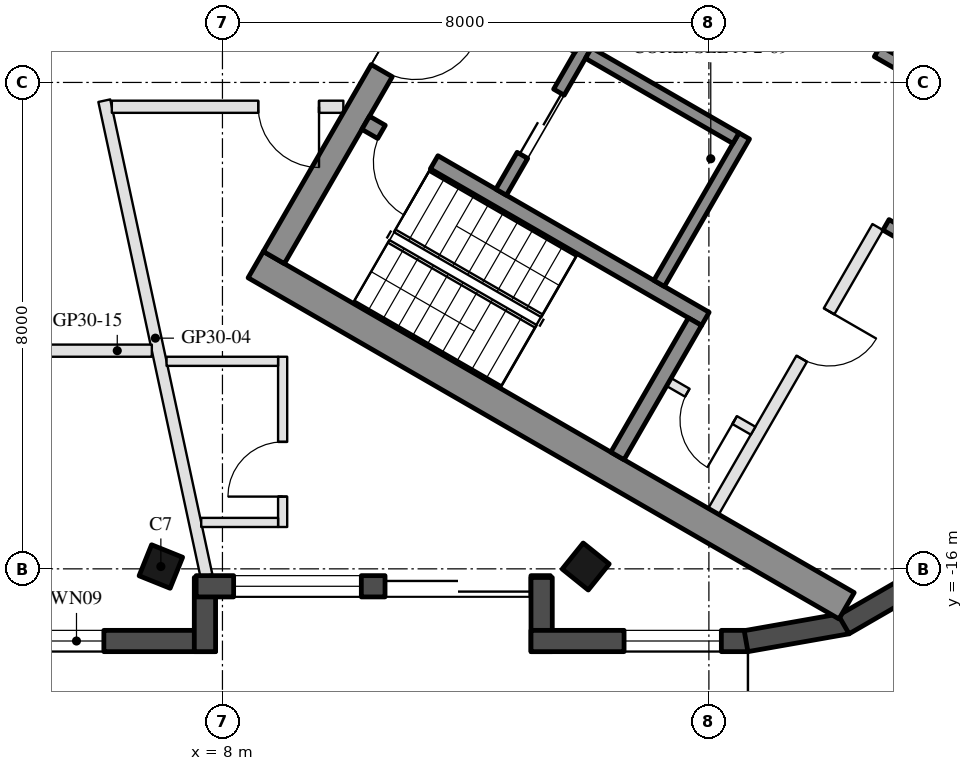
"""IFC4 building model, lengths in metres.
Left out: names, types, materials, properties, quantities, classifications, styles, units other than length and angle.
Written with IfcOpenShell. Run it as: python <this file> out.ifc"""

import sys

from ifc_helpers import new_model, si_unit, direction, frame, frame_2d, origin, origin_2d, place, context, subcontext, project, spatial, rectangle, hollow_rectangle, extrude, boolean, halfspace, element, fill, save


model = new_model("IFC4")
c1 = context("Model", 3, precision=1e-05, world=origin(), true_north=direction((0.0, 1.0)))
c2 = subcontext(c1, "Body", "Model", "MODEL_VIEW")
j1 = project(units=[si_unit("LENGTHUNIT", "METRE"), si_unit("PLANEANGLEUNIT", "RADIAN")], contexts=[c1])
p1 = place(None, origin())
s1 = spatial("IfcSite", under=j1, at=p1, CompositionType="ELEMENT")
p2 = place(p1, origin())
s2 = spatial("IfcBuilding", under=s1, at=p2, CompositionType="ELEMENT")
p3 = place(p2, frame((0.0, 0.0, 298.5)))
s3 = spatial("IfcBuildingStorey", under=s2, at=p3, CompositionType="ELEMENT", Elevation=298.5)
p4 = place(p3, frame((6.987, -15.962, 0.0), z_axis=(-0.060870463553, 0.151232178432, 0.986622326361), x_axis=(0.998135049207, 0.004661833801, 0.060866171632)))
e1 = element("IfcColumn", 1, at=p4, inside=s3, PredefinedType="COLUMN", context=c2, shape_type="SweptSolid", body=[
    boolean("DIFFERENCE", boolean("DIFFERENCE", extrude(hollow_rectangle(XDim=0.55, YDim=0.55, WallThickness=0.025, at=origin_2d()), origin(), (0.0, 0.0, 1.0), 3.75), halfspace(frame((0.0, 0.0, 0.034), z_axis=(0.0, 0.0, 1.0), x_axis=(1.0, 0.0, 0.0)), True)), halfspace(frame((0.0, 0.0, 3.716), z_axis=(0.0, 0.0, 1.0), x_axis=(1.0, 0.0, 0.0)), False)),
])
p5 = place(p3, frame((13.974, -15.962, 0.0), z_axis=(-0.121006106938, 0.150399778714, 0.981191840899), x_axis=(0.992607126943, 0.008959505222, 0.121040566785)))
e2 = element("IfcColumn", 2, at=p5, inside=s3, PredefinedType="COLUMN", context=c2, shape_type="SweptSolid", body=[
    boolean("DIFFERENCE", boolean("DIFFERENCE", extrude(hollow_rectangle(XDim=0.55, YDim=0.55, WallThickness=0.025, at=origin_2d()), origin(), (0.0, 0.0, 1.0), 3.771), halfspace(frame((0.0, 0.0, 0.04), z_axis=(0.0, 0.0, 1.0), x_axis=(1.0, 0.0, 0.0)), True)), halfspace(frame((0.0, 0.0, 3.731), z_axis=(0.0, 0.0, 1.0), x_axis=(1.0, 0.0, 0.0)), False)),
])
p6 = place(p3, frame((20.936, -12.087, 0.0), z_axis=(-0.190408197016, 0.109880592395, 0.975536249416), x_axis=(0.499868084483, 0.866101551773, 1.1510724e-05)))
e3 = element("IfcColumn", 3, at=p6, inside=s3, PredefinedType="COLUMN", context=c2, shape_type="SweptSolid", body=[
    boolean("DIFFERENCE", boolean("DIFFERENCE", extrude(hollow_rectangle(XDim=2.0, YDim=2.0, WallThickness=0.05, at=origin_2d()), origin(), (0.0, 0.0, 1.0), 3.793), halfspace(frame((0.0, 0.0, 0.113), z_axis=(0.0, 0.0, 1.0), x_axis=(1.0, 0.0, 0.0)), True)), halfspace(frame((0.0, 0.0, 3.679), z_axis=(0.0, 0.0, 1.0), x_axis=(1.0, 0.0, 0.0)), False)),
])
p7 = place(p3, frame((-0.9, -17.187, 0.0), z_axis=(0.0, 0.0, 1.0), x_axis=(1.0, 0.0, 0.0)))
e4 = element("IfcWall", 4, at=p7, inside=s3, PredefinedType="SOLIDWALL", context=c2, shape_type="SweptSolid", body=[
    extrude(rectangle(XDim=8.787, YDim=0.35, at=frame_2d((4.394, 0.0))), origin(), (0.0, 0.0, 1.0), 3.55),
])
p8 = place(p7, frame((1.528, 0.0, 0.3)))
e5 = element("IfcOpeningElement", 5, at=p8, cuts=e4, PredefinedType="OPENING", context=c2, shape_type="SweptSolid", body=[
    extrude(rectangle(XDim=0.9, YDim=2.65, at=frame_2d((0.45, 1.325))), frame((0.0, 0.185, 0.0), z_axis=(0.0, -1.0, 0.0), x_axis=(1.0, 0.0, 0.0)), (0.0, 0.0, 1.0), 0.37),
])
p9 = place(p7, frame((3.35, 0.0, 0.0)))
e6 = element("IfcOpeningElement", 6, at=p9, cuts=e4, PredefinedType="OPENING", context=c2, shape_type="SweptSolid", body=[
    extrude(rectangle(XDim=2.4, YDim=2.4, at=frame_2d((1.2, 1.2))), frame((0.0, 0.185, 0.0), z_axis=(0.0, -1.0, 0.0), x_axis=(1.0, 0.0, 0.0)), (0.0, 0.0, 1.0), 0.37),
])
p10 = place(p7, frame((6.05, 0.0, 0.3)))
e7 = element("IfcOpeningElement", 7, at=p10, cuts=e4, PredefinedType="OPENING", context=c2, shape_type="SweptSolid", body=[
    extrude(rectangle(XDim=0.9, YDim=2.65, at=frame_2d((0.45, 1.325))), frame((0.0, 0.185, 0.0), z_axis=(0.0, -1.0, 0.0), x_axis=(1.0, 0.0, 0.0)), (0.0, 0.0, 1.0), 0.37),
])
p11 = place(p3, frame((7.712, -17.362, 0.0), z_axis=(0.0, 0.0, 1.0), x_axis=(0.0, 1.0, 0.0)))
e8 = element("IfcWall", 8, at=p11, inside=s3, PredefinedType="SOLIDWALL", context=c2, shape_type="SweptSolid", body=[
    extrude(rectangle(XDim=1.22, YDim=0.35, at=frame_2d((0.61, 0.0))), origin(), (0.0, 0.0, 1.0), 3.55),
])
p12 = place(p3, frame((7.567, -16.287, 0.0), z_axis=(0.0, 0.0, 1.0), x_axis=(1.0, 0.0, 0.0)))
e9 = element("IfcWall", 9, at=p12, inside=s3, PredefinedType="SOLIDWALL", context=c2, shape_type="SweptSolid", body=[
    extrude(rectangle(XDim=5.827, YDim=0.35, at=frame_2d((2.914, 0.0))), origin(), (0.0, 0.0, 1.0), 3.55),
])
p13 = place(p12, frame((3.107, 0.0, 0.0)))
e10 = element("IfcOpeningElement", 10, at=p13, cuts=e9, PredefinedType="OPENING", context=c2, shape_type="SweptSolid", body=[
    extrude(rectangle(XDim=2.4, YDim=2.4, at=frame_2d((1.2, 1.2))), frame((0.0, 0.185, 0.0), z_axis=(0.0, -1.0, 0.0), x_axis=(1.0, 0.0, 0.0)), (0.0, 0.0, 1.0), 0.37),
])
p14 = place(p12, frame((0.617, 0.0, 0.3)))
e11 = element("IfcOpeningElement", 11, at=p14, cuts=e9, PredefinedType="OPENING", context=c2, shape_type="SweptSolid", body=[
    extrude(rectangle(XDim=2.1, YDim=2.65, at=frame_2d((1.05, 1.325))), frame((0.0, 0.185, 0.0), z_axis=(0.0, -1.0, 0.0), x_axis=(1.0, 0.0, 0.0)), (0.0, 0.0, 1.0), 0.37),
])
p15 = place(p3, frame((13.249, -16.142, 0.0), z_axis=(0.0, 0.0, 1.0), x_axis=(0.0, -1.0, 0.0)))
e12 = element("IfcWall", 12, at=p15, inside=s3, PredefinedType="SOLIDWALL", context=c2, shape_type="SweptSolid", body=[
    extrude(rectangle(XDim=1.22, YDim=0.35, at=frame_2d((0.61, 0.0))), origin(), (0.0, 0.0, 1.0), 3.55),
])
p16 = place(p3, frame((13.074, -17.187, 0.0), z_axis=(0.0, 0.0, 1.0), x_axis=(1.0, 0.0, 0.0)))
e13 = element("IfcWall", 13, at=p16, inside=s3, PredefinedType="SOLIDWALL", context=c2, shape_type="SweptSolid", body=[
    extrude(rectangle(XDim=3.567, YDim=0.35, at=frame_2d((1.784, 0.0))), origin(), (0.0, 0.0, 1.0), 3.55),
])
p17 = place(p16, frame((1.531, 0.0, 0.3)))
e14 = element("IfcOpeningElement", 14, at=p17, cuts=e13, PredefinedType="OPENING", context=c2, shape_type="SweptSolid", body=[
    extrude(rectangle(XDim=1.6, YDim=2.65, at=frame_2d((0.8, 1.325))), frame((0.0, 0.185, 0.0), z_axis=(0.0, -1.0, 0.0), x_axis=(1.0, 0.0, 0.0)), (0.0, 0.0, 1.0), 0.37),
])
for number, where, z_axis, x_axis in (
    (15, (16.611, -17.189, 0.0), (0.0, 0.0, 1.0), (0.985, 0.174, 0.0)),
    (16, (18.218, -16.917, 0.0), (0.0, 0.0, 1.0), (0.866, 0.5, 0.0)),
):
    element("IfcWall", number, at=place(p3, frame(where, z_axis=z_axis, x_axis=x_axis)), inside=s3, PredefinedType="SOLIDWALL", context=c2, shape_type="SweptSolid", body=[
        extrude(rectangle(XDim=1.689, YDim=0.35, at=frame_2d((0.845, 0.0))), origin(), (0.0, 0.0, 1.0), 3.55),
    ])
for number, where, z_axis, x_axis in (
    (17, (8.547, -10.997, 0.0), (0.0, 0.0, 1.0), (0.866, -0.5, 0.0)),
    (18, (13.797, -1.903, 0.0), (0.0, 0.0, 1.0), (0.866, -0.5, 0.0)),
):
    element("IfcWall", number, at=place(p3, frame(where, z_axis=z_axis, x_axis=x_axis)), inside=s3, PredefinedType="SHEAR", context=c2, shape_type="SweptSolid", body=[
        extrude(rectangle(XDim=11.222, YDim=0.5, at=frame_2d((5.611, 0.0))), origin(), (0.0, 0.0, 1.0), 3.5),
    ])
p18 = place(p3, frame((8.845, -10.88, 0.0), z_axis=(0.0, 0.0, 1.0), x_axis=(0.500004234368, 0.866022959057, 0.0)))
e19 = element("IfcWall", 19, at=p18, inside=s3, PredefinedType="SHEAR", context=c2, shape_type="SweptSolid", body=[
    extrude(rectangle(XDim=10.0, YDim=0.4, at=frame_2d((5.0, 0.0))), origin(), (0.0, 0.0, 1.0), 3.5),
])
p19 = place(p18, frame((3.55, 0.0, 0.0)))
e20 = element("IfcOpeningElement", 20, at=p19, cuts=e19, PredefinedType="OPENING", context=c2, shape_type="SweptSolid", body=[
    extrude(rectangle(XDim=1.1, YDim=2.1, at=frame_2d((0.55, 1.05))), frame((0.0, 0.21, 0.0), z_axis=(0.0, -1.0, 0.0), x_axis=(1.0, 0.0, 0.0)), (0.0, 0.0, 1.0), 0.42),
])
p20 = place(p18, frame((5.85, 0.0, 0.0)))
e21 = element("IfcOpeningElement", 21, at=p20, cuts=e19, PredefinedType="OPENING", context=c2, shape_type="SweptSolid", body=[
    extrude(rectangle(XDim=1.4, YDim=2.1, at=frame_2d((0.7, 1.05))), frame((0.0, 0.21, 0.0), z_axis=(0.0, -1.0, 0.0), x_axis=(1.0, 0.0, 0.0)), (0.0, 0.0, 1.0), 0.42),
])
p21 = place(p3, frame((10.356, -8.664, 0.0), z_axis=(0.0, 0.0, 1.0), x_axis=(0.866028629588, -0.499994412703, 0.0)))
e22 = element("IfcWall", 22, at=p21, inside=s3, PredefinedType="SHEAR", context=c2, shape_type="SweptSolid", body=[
    extrude(rectangle(XDim=6.45, YDim=0.25, at=frame_2d((3.225, 0.0))), origin(), (0.0, 0.0, 1.0), 3.5),
])
p22 = place(p21, frame((0.3, 0.0, 0.0)))
e23 = element("IfcOpeningElement", 23, at=p22, cuts=e22, PredefinedType="OPENING", context=c2, shape_type="SweptSolid", body=[
    extrude(rectangle(XDim=1.0, YDim=2.1, at=frame_2d((0.5, 1.05))), frame((0.0, 0.135, 0.0), z_axis=(0.0, -1.0, 0.0), x_axis=(1.0, 0.0, 0.0)), (0.0, 0.0, 1.0), 0.27),
])
p23 = place(p3, frame((14.496, -14.143, 0.0), z_axis=(0.0, 0.0, 1.0), x_axis=(0.500062241894, 0.865989465428, 0.0)))
e24 = element("IfcWall", 24, at=p23, inside=s3, PredefinedType="SHEAR", context=c2, shape_type="SweptSolid", body=[
    extrude(rectangle(XDim=2.55, YDim=0.25, at=frame_2d((1.275, 0.0))), origin(), (0.0, 0.0, 1.0), 3.5),
])
p24 = place(p3, frame((15.181, -11.305, 0.0), z_axis=(0.0, 0.0, 1.0), x_axis=(0.49994636267, 0.866056369097, 0.0)))
e25 = element("IfcWall", 25, at=p24, inside=s3, PredefinedType="SHEAR", context=c2, shape_type="SweptSolid", body=[
    extrude(rectangle(XDim=2.8, YDim=0.2, at=frame_2d((1.4, 0.0))), origin(), (0.0, 0.0, 1.0), 3.5),
])
p25 = place(p3, frame((12.583, -9.805, 0.0), z_axis=(0.0, 0.0, 1.0), x_axis=(0.49994636267, 0.866056369097, 0.0)))
e26 = element("IfcWall", 26, at=p25, inside=s3, PredefinedType="SHEAR", context=c2, shape_type="SweptSolid", body=[
    extrude(rectangle(XDim=2.8, YDim=0.2, at=frame_2d((1.4, 0.0))), origin(), (0.0, 0.0, 1.0), 3.5),
])
p26 = place(p25, frame((0.7, 0.0, 0.0)))
e27 = element("IfcOpeningElement", 27, at=p26, cuts=e26, PredefinedType="OPENING", context=c2, shape_type="SweptSolid", body=[
    extrude(rectangle(XDim=1.2, YDim=2.1, at=frame_2d((0.6, 1.05))), frame((0.0, 0.11, 0.0), z_axis=(0.0, -1.0, 0.0), x_axis=(1.0, 0.0, 0.0)), (0.0, 0.0, 1.0), 0.22),
])
p27 = place(p3, frame((11.768, -6.217, 0.0), z_axis=(0.0, 0.0, 1.0), x_axis=(0.866050077142, -0.499957262057, 0.0)))
e28 = element("IfcWall", 28, at=p27, inside=s3, PredefinedType="SHEAR", context=c2, shape_type="SweptSolid", body=[
    extrude(rectangle(XDim=2.4, YDim=0.2, at=frame_2d((1.2, 0.0))), origin(), (0.0, 0.0, 1.0), 3.5),
])
p28 = place(p3, frame((14.02, -7.517, 0.0), z_axis=(0.0, 0.0, 1.0), x_axis=(0.866034573852, -0.49998411664, 0.0)))
e29 = element("IfcWall", 29, at=p28, inside=s3, PredefinedType="SHEAR", context=c2, shape_type="SweptSolid", body=[
    extrude(rectangle(XDim=2.8, YDim=0.2, at=frame_2d((1.4, 0.0))), origin(), (0.0, 0.0, 1.0), 3.5),
])
p29 = place(p3, frame((12.968, -4.138, 0.0), z_axis=(0.0, 0.0, 1.0), x_axis=(0.866028328073, -0.49999493495, 0.0)))
e30 = element("IfcWall", 30, at=p29, inside=s3, PredefinedType="SHEAR", context=c2, shape_type="SweptSolid", body=[
    extrude(rectangle(XDim=10.16, YDim=0.2, at=frame_2d((5.08, 0.0))), origin(), (0.0, 0.0, 1.0), 3.5),
])
p30 = place(p29, frame((0.62, 0.0, 0.0)))
e31 = element("IfcOpeningElement", 31, at=p30, cuts=e30, PredefinedType="OPENING", context=c2, shape_type="SweptSolid", body=[
    extrude(rectangle(XDim=1.1, YDim=2.1, at=frame_2d((0.55, 1.05))), frame((0.0, 0.11, 0.0), z_axis=(0.0, -1.0, 0.0), x_axis=(1.0, 0.0, 0.0)), (0.0, 0.0, 1.0), 0.22),
])
p31 = place(p29, frame((5.8, 0.0, 0.0)))
e32 = element("IfcOpeningElement", 32, at=p31, cuts=e30, PredefinedType="OPENING", context=c2, shape_type="SweptSolid", body=[
    extrude(rectangle(XDim=0.9, YDim=2.1, at=frame_2d((0.45, 1.05))), frame((0.0, 0.11, 0.0), z_axis=(0.0, -1.0, 0.0), x_axis=(1.0, 0.0, 0.0)), (0.0, 0.0, 1.0), 0.22),
])
p32 = place(p3, frame((18.913, -10.342, 0.0), z_axis=(0.0, 0.0, 1.0), x_axis=(0.866053003207, -0.499952193351, 0.0)))
e33 = element("IfcWall", 33, at=p32, inside=s3, PredefinedType="SHEAR", context=c2, shape_type="SweptSolid", body=[
    extrude(rectangle(XDim=1.625, YDim=0.2, at=frame_2d((0.812, 0.0))), origin(), (0.0, 0.0, 1.0), 3.5),
])
p33 = place(p3, frame((16.076, -15.055, 0.0), z_axis=(0.0, 0.0, 1.0), x_axis=(0.499995103361, 0.866028230842, 0.0)))
e34 = element("IfcWall", 34, at=p33, inside=s3, PredefinedType="PARTITIONING", context=c2, shape_type="SweptSolid", body=[
    extrude(rectangle(XDim=5.4, YDim=0.2, at=frame_2d((2.7, 0.0))), origin(), (0.0, 0.0, 1.0), 3.5),
])
p34 = place(p33, frame((2.9, 0.0, 0.0)))
e35 = element("IfcOpeningElement", 35, at=p34, cuts=e34, PredefinedType="OPENING", context=c2, shape_type="SweptSolid", body=[
    extrude(rectangle(XDim=0.9, YDim=2.1, at=frame_2d((0.45, 1.05))), frame((0.0, 0.11, 0.0), z_axis=(0.0, -1.0, 0.0), x_axis=(1.0, 0.0, 0.0)), (0.0, 0.0, 1.0), 0.22),
])
p35 = place(p3, frame((15.342, -12.928, 0.0), z_axis=(0.0, 0.0, 1.0), x_axis=(0.865989903783, -0.500061482766, 0.0)))
e36 = element("IfcWall", 36, at=p35, inside=s3, PredefinedType="PARTITIONING", context=c2, shape_type="SweptSolid", body=[
    extrude(rectangle(XDim=1.6, YDim=0.15, at=frame_2d((0.8, 0.0))), origin(), (0.0, 0.0, 1.0), 3.5),
])
p36 = place(p35, frame((0.35, 0.0, 0.0)))
e37 = element("IfcOpeningElement", 37, at=p36, cuts=e36, PredefinedType="OPENING", context=c2, shape_type="SweptSolid", body=[
    extrude(rectangle(XDim=0.9, YDim=2.1, at=frame_2d((0.45, 1.05))), frame((0.0, 0.085, 0.0), z_axis=(0.0, -1.0, 0.0), x_axis=(1.0, 0.0, 0.0)), (0.0, 0.0, 1.0), 0.17),
])
p37 = place(p3, frame((7.737, -16.112, 0.0), z_axis=(0.0, 0.0, 1.0), x_axis=(-0.210221826162, 0.977653713646, 0.0)))
e38 = element("IfcWall", 38, at=p37, inside=s3, PredefinedType="PARTITIONING", context=c2, shape_type="SweptSolid", body=[
    extrude(rectangle(XDim=7.99, YDim=0.2, at=frame_2d((3.995, 0.0))), origin(), (0.0, 0.0, 1.0), 3.1),
])
p38 = place(p3, frame((6.839, -12.412, 0.0), z_axis=(0.0, 0.0, 1.0), x_axis=(-1.0, 0.0, 0.0)))
e39 = element("IfcWall", 39, at=p38, inside=s3, PredefinedType="PARTITIONING", context=c2, shape_type="SweptSolid", body=[
    extrude(rectangle(XDim=4.739, YDim=0.2, at=frame_2d((2.369, 0.0))), origin(), (0.0, 0.0, 1.0), 3.1),
])
p39 = place(p38, frame((1.869, 0.0, 0.0)))
e40 = element("IfcOpeningElement", 40, at=p39, cuts=e39, PredefinedType="OPENING", context=c2, shape_type="SweptSolid", body=[
    extrude(rectangle(XDim=1.0, YDim=2.1, at=frame_2d((0.5, 1.05))), frame((0.0, 0.11, 0.0), z_axis=(0.0, -1.0, 0.0), x_axis=(1.0, 0.0, 0.0)), (0.0, 0.0, 1.0), 0.22),
])
p40 = place(p3, frame((9.988, -8.4, 0.0), z_axis=(0.0, 0.0, 1.0), x_axis=(-1.0, 0.0, 0.0)))
e41 = element("IfcWall", 41, at=p40, inside=s3, PredefinedType="PARTITIONING", context=c2, shape_type="SweptSolid", body=[
    extrude(rectangle(XDim=3.807, YDim=0.2, at=frame_2d((1.904, 0.0))), origin(), (0.0, 0.0, 1.0), 3.1),
])
p41 = place(p40, frame((0.4, 0.0, 0.0)))
e42 = element("IfcOpeningElement", 42, at=p41, cuts=e41, PredefinedType="OPENING", context=c2, shape_type="SweptSolid", body=[
    extrude(rectangle(XDim=1.0, YDim=2.1, at=frame_2d((0.5, 1.05))), frame((0.0, 0.11, 0.0), z_axis=(0.0, -1.0, 0.0), x_axis=(1.0, 0.0, 0.0)), (0.0, 0.0, 1.0), 0.22),
])
p42 = place(p3, frame((8.99, -15.312, 0.0), z_axis=(0.0, 0.0, 1.0), x_axis=(0.0, 1.0, 0.0)))
e43 = element("IfcWall", 43, at=p42, inside=s3, PredefinedType="PARTITIONING", context=c2, shape_type="SweptSolid", body=[
    extrude(rectangle(XDim=2.8, YDim=0.15, at=frame_2d((1.4, 0.0))), origin(), (0.0, 0.0, 1.0), 3.1),
])
p43 = place(p42, frame((0.5, 0.0, 0.0)))
e44 = element("IfcOpeningElement", 44, at=p43, cuts=e43, PredefinedType="OPENING", context=c2, shape_type="SweptSolid", body=[
    extrude(rectangle(XDim=0.9, YDim=2.1, at=frame_2d((0.45, 1.05))), frame((0.0, 0.085, 0.0), z_axis=(0.0, -1.0, 0.0), x_axis=(1.0, 0.0, 0.0)), (0.0, 0.0, 1.0), 0.17),
])
p44 = place(p3, frame((7.651, -15.237, 0.0), z_axis=(0.0, 0.0, 1.0), x_axis=(1.0, 0.0, 0.0)))
e45 = element("IfcWall", 45, at=p44, inside=s3, PredefinedType="PARTITIONING", context=c2, shape_type="SweptSolid", body=[
    extrude(rectangle(XDim=1.264, YDim=0.15, at=frame_2d((0.632, 0.0))), origin(), (0.0, 0.0, 1.0), 3.1),
])
p45 = place(p3, frame((7.081, -12.587, 0.0), z_axis=(0.0, 0.0, 1.0), x_axis=(1.0, 0.0, 0.0)))
e46 = element("IfcWall", 46, at=p45, inside=s3, PredefinedType="PARTITIONING", context=c2, shape_type="SweptSolid", body=[
    extrude(rectangle(XDim=1.834, YDim=0.15, at=frame_2d((0.917, 0.0))), origin(), (0.0, 0.0, 1.0), 3.55),
])
p46 = place(p10, origin())
e47 = element("IfcWindow", 47, at=p46, inside=s3, PartitioningType="SINGLE_PANEL", PredefinedType="WINDOW", context=c2, shape_type="SweptSolid", body=[
    extrude(rectangle(XDim=0.9, YDim=2.65, at=frame_2d((0.45, 1.325))), frame((0.0, 0.03, 0.0), z_axis=(0.0, -1.0, 0.0), x_axis=(1.0, 0.0, 0.0)), (0.0, 0.0, 1.0), 0.06),
])
fill(e7, e47)
p47 = place(p13, frame((2.4, 0.0, 0.0), z_axis=(0.0, 0.0, 1.0), x_axis=(-1.0, 0.0, 0.0)))
e48 = element("IfcDoor", 48, at=p47, inside=s3, OperationType="SLIDING_TO_LEFT", PredefinedType="DOOR", context=c2, shape_type="SweptSolid", body=[
    extrude(rectangle(XDim=2.4, YDim=2.4, at=frame_2d((1.2, 1.2))), frame((0.0, 0.025, 0.0), z_axis=(0.0, -1.0, 0.0), x_axis=(1.0, 0.0, 0.0)), (0.0, 0.0, 1.0), 0.05),
])
fill(e10, e48)
p48 = place(p14, origin())
e49 = element("IfcWindow", 49, at=p48, inside=s3, PartitioningType="SINGLE_PANEL", PredefinedType="WINDOW", context=c2, shape_type="SweptSolid", body=[
    extrude(rectangle(XDim=2.1, YDim=2.65, at=frame_2d((1.05, 1.325))), frame((0.0, 0.03, 0.0), z_axis=(0.0, -1.0, 0.0), x_axis=(1.0, 0.0, 0.0)), (0.0, 0.0, 1.0), 0.06),
])
fill(e11, e49)
p49 = place(p17, origin())
e50 = element("IfcWindow", 50, at=p49, inside=s3, PartitioningType="SINGLE_PANEL", PredefinedType="WINDOW", context=c2, shape_type="SweptSolid", body=[
    extrude(rectangle(XDim=1.6, YDim=2.65, at=frame_2d((0.8, 1.325))), frame((0.0, 0.03, 0.0), z_axis=(0.0, -1.0, 0.0), x_axis=(1.0, 0.0, 0.0)), (0.0, 0.0, 1.0), 0.06),
])
fill(e14, e50)
p50 = place(p26, origin())
e51 = element("IfcDoor", 51, at=p50, inside=s3, OperationType="DOUBLE_DOOR_SLIDING", PredefinedType="DOOR", context=c2, shape_type="SweptSolid", body=[
    extrude(rectangle(XDim=1.2, YDim=2.1, at=frame_2d((0.6, 1.05))), frame((0.0, 0.025, 0.0), z_axis=(0.0, -1.0, 0.0), x_axis=(1.0, 0.0, 0.0)), (0.0, 0.0, 1.0), 0.05),
])
fill(e27, e51)
p51 = place(p36, frame((0.9, 0.0, 0.0), z_axis=(0.0, 0.0, 1.0), x_axis=(-1.0, 0.0, 0.0)))
e52 = element("IfcDoor", 52, at=p51, inside=s3, OperationType="SINGLE_SWING_LEFT", PredefinedType="DOOR", context=c2, shape_type="SweptSolid", body=[
    extrude(rectangle(XDim=0.9, YDim=2.1, at=frame_2d((0.45, 1.05))), frame((0.0, 0.025, 0.0), z_axis=(0.0, -1.0, 0.0), x_axis=(1.0, 0.0, 0.0)), (0.0, 0.0, 1.0), 0.05),
])
fill(e37, e52)
p52 = place(p31, origin())
e53 = element("IfcDoor", 53, at=p52, inside=s3, OperationType="SINGLE_SWING_LEFT", PredefinedType="DOOR", context=c2, shape_type="SweptSolid", body=[
    extrude(rectangle(XDim=0.9, YDim=2.1, at=frame_2d((0.45, 1.05))), frame((0.0, 0.025, 0.0), z_axis=(0.0, -1.0, 0.0), x_axis=(1.0, 0.0, 0.0)), (0.0, 0.0, 1.0), 0.05),
])
fill(e32, e53)
p53 = place(p34, frame((0.9, 0.0, 0.0), z_axis=(0.0, 0.0, 1.0), x_axis=(-1.0, 0.0, 0.0)))
e54 = element("IfcDoor", 54, at=p53, inside=s3, OperationType="SINGLE_SWING_LEFT", PredefinedType="DOOR", context=c2, shape_type="SweptSolid", body=[
    extrude(rectangle(XDim=0.9, YDim=2.1, at=frame_2d((0.45, 1.05))), frame((0.0, 0.025, 0.0), z_axis=(0.0, -1.0, 0.0), x_axis=(1.0, 0.0, 0.0)), (0.0, 0.0, 1.0), 0.05),
])
fill(e35, e54)
p54 = place(p19, frame((1.1, 0.0, 0.0), z_axis=(0.0, 0.0, 1.0), x_axis=(-1.0, 0.0, 0.0)))
e55 = element("IfcDoor", 55, at=p54, inside=s3, OperationType="SINGLE_SWING_LEFT", PredefinedType="DOOR", context=c2, shape_type="SweptSolid", body=[
    extrude(rectangle(XDim=1.1, YDim=2.1, at=frame_2d((0.55, 1.05))), frame((0.0, 0.025, 0.0), z_axis=(0.0, -1.0, 0.0), x_axis=(1.0, 0.0, 0.0)), (0.0, 0.0, 1.0), 0.05),
])
fill(e20, e55)
p55 = place(p22, frame((1.0, 0.0, 0.0), z_axis=(0.0, 0.0, 1.0), x_axis=(-1.0, 0.0, 0.0)))
e56 = element("IfcDoor", 56, at=p55, inside=s3, OperationType="SINGLE_SWING_LEFT", PredefinedType="DOOR", context=c2, shape_type="SweptSolid", body=[
    extrude(rectangle(XDim=1.0, YDim=2.1, at=frame_2d((0.5, 1.05))), frame((0.0, 0.025, 0.0), z_axis=(0.0, -1.0, 0.0), x_axis=(1.0, 0.0, 0.0)), (0.0, 0.0, 1.0), 0.05),
])
fill(e23, e56)
p56 = place(p43, origin())
e57 = element("IfcDoor", 57, at=p56, inside=s3, OperationType="SINGLE_SWING_LEFT", PredefinedType="DOOR", context=c2, shape_type="SweptSolid", body=[
    extrude(rectangle(XDim=0.9, YDim=2.1, at=frame_2d((0.45, 1.05))), frame((0.0, 0.025, 0.0), z_axis=(0.0, -1.0, 0.0), x_axis=(1.0, 0.0, 0.0)), (0.0, 0.0, 1.0), 0.05),
])
fill(e44, e57)
p57 = place(p41, origin())
e58 = element("IfcDoor", 58, at=p57, inside=s3, OperationType="SINGLE_SWING_LEFT", PredefinedType="DOOR", context=c2, shape_type="SweptSolid", body=[
    extrude(rectangle(XDim=1.0, YDim=2.1, at=frame_2d((0.5, 1.05))), frame((0.0, 0.025, 0.0), z_axis=(0.0, -1.0, 0.0), x_axis=(1.0, 0.0, 0.0)), (0.0, 0.0, 1.0), 0.05),
])
fill(e42, e58)
save(model, sys.argv[1])
